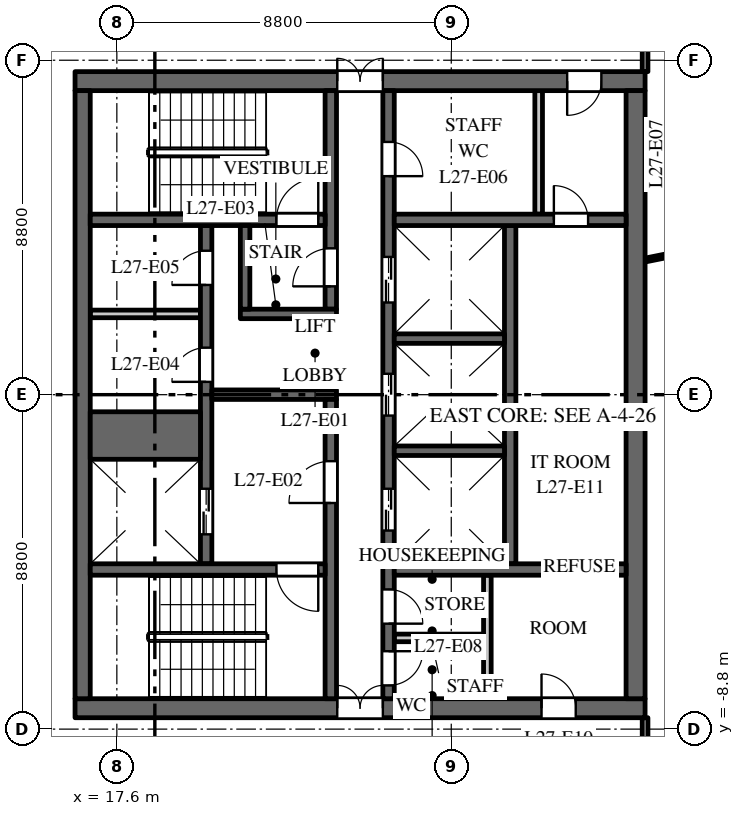
"""IFC4 building model, lengths in metres.
Left out: names, types, materials, properties, quantities, classifications, styles, units other than length and angle.
Written with IfcOpenShell. Run it as: python <this file> out.ifc"""

import sys

from ifc_helpers import new_model, si_unit, direction, frame, frame_2d, origin, place, context, subcontext, project, spatial, rectangle, extrude, element, fill, save


model = new_model("IFC4")
c1 = context("Model", 3, precision=1e-05, world=origin(), true_north=direction((0.0, 1.0)))
c2 = subcontext(c1, "Body", "Model", "MODEL_VIEW")
j1 = project(units=[si_unit("LENGTHUNIT", "METRE"), si_unit("PLANEANGLEUNIT", "RADIAN")], contexts=[c1])
p1 = place(None, origin())
s1 = spatial("IfcSite", under=j1, at=p1, CompositionType="ELEMENT")
p2 = place(p1, origin())
s2 = spatial("IfcBuilding", under=s1, at=p2, CompositionType="ELEMENT")
p3 = place(p2, frame((0.0, 0.0, 120.0)))
s3 = spatial("IfcBuildingStorey", under=s2, at=p3, CompositionType="ELEMENT", Elevation=120.0)
p4 = place(p3, frame((16.5, 8.25, 0.0), z_axis=(0.0, 0.0, 1.0), x_axis=(1.0, 0.0, 0.0)))
e1 = element("IfcWall", 1, at=p4, inside=s3, PredefinedType="SHEAR", context=c2, shape_type="SweptSolid", body=[
    extrude(rectangle(XDim=15.0, YDim=0.5, at=frame_2d((7.5, 0.0))), origin(), (0.0, 0.0, 1.0), 3.7),
])
p5 = place(p4, frame((6.9, 0.0, 0.0)))
e2 = element("IfcOpeningElement", 2, at=p5, cuts=e1, PredefinedType="OPENING", context=c2, shape_type="SweptSolid", body=[
    extrude(rectangle(XDim=1.2, YDim=2.1, at=frame_2d((0.6, 1.05))), frame((0.0, 0.26, 0.0), z_axis=(0.0, -1.0, 0.0), x_axis=(1.0, 0.0, 0.0)), (0.0, 0.0, 1.0), 0.52),
])
p6 = place(p4, frame((12.95, 0.0, 0.0)))
e3 = element("IfcOpeningElement", 3, at=p6, cuts=e1, PredefinedType="OPENING", context=c2, shape_type="SweptSolid", body=[
    extrude(rectangle(XDim=0.9, YDim=2.1, at=frame_2d((0.45, 1.05))), frame((0.0, 0.26, 0.0), z_axis=(0.0, -1.0, 0.0), x_axis=(1.0, 0.0, 0.0)), (0.0, 0.0, 1.0), 0.52),
])
p7 = place(p3, frame((16.5, -8.25, 0.0), z_axis=(0.0, 0.0, 1.0), x_axis=(1.0, 0.0, 0.0)))
e4 = element("IfcWall", 4, at=p7, inside=s3, PredefinedType="SHEAR", context=c2, shape_type="SweptSolid", body=[
    extrude(rectangle(XDim=15.0, YDim=0.5, at=frame_2d((7.5, 0.0))), origin(), (0.0, 0.0, 1.0), 3.7),
])
p8 = place(p7, frame((6.9, 0.0, 0.0)))
e5 = element("IfcOpeningElement", 5, at=p8, cuts=e4, PredefinedType="OPENING", context=c2, shape_type="SweptSolid", body=[
    extrude(rectangle(XDim=1.2, YDim=2.1, at=frame_2d((0.6, 1.05))), frame((0.0, 0.26, 0.0), z_axis=(0.0, -1.0, 0.0), x_axis=(1.0, 0.0, 0.0)), (0.0, 0.0, 1.0), 0.52),
])
p9 = place(p7, frame((12.275, 0.0, 0.0)))
e6 = element("IfcOpeningElement", 6, at=p9, cuts=e4, PredefinedType="OPENING", context=c2, shape_type="SweptSolid", body=[
    extrude(rectangle(XDim=0.9, YDim=2.1, at=frame_2d((0.45, 1.05))), frame((0.0, 0.26, 0.0), z_axis=(0.0, -1.0, 0.0), x_axis=(1.0, 0.0, 0.0)), (0.0, 0.0, 1.0), 0.52),
])
p10 = place(p3, frame((16.9, 2.125, 0.0), z_axis=(0.0, 0.0, 1.0), x_axis=(1.0, 0.0, 0.0)))
e7 = element("IfcWall", 7, at=p10, inside=s3, PredefinedType="PARTITIONING", context=c2, shape_type="SweptSolid", body=[
    extrude(rectangle(XDim=2.9, YDim=0.2, at=frame_2d((1.45, 0.0))), origin(), (0.0, 0.0, 1.0), 3.7),
])
p11 = place(p3, frame((27.95, -4.45, 0.0), z_axis=(0.0, 0.0, 1.0), x_axis=(0.0, 1.0, 0.0)))
e8 = element("IfcWall", 8, at=p11, inside=s3, PredefinedType="SHEAR", context=c2, shape_type="SweptSolid", body=[
    extrude(rectangle(XDim=8.9, YDim=0.3, at=frame_2d((4.45, 0.0))), origin(), (0.0, 0.0, 1.0), 3.7),
])
p12 = place(p3, frame((19.95, -4.45, 0.0), z_axis=(0.0, 0.0, 1.0), x_axis=(0.0, 1.0, 0.0)))
e9 = element("IfcWall", 9, at=p12, inside=s3, PredefinedType="SHEAR", context=c2, shape_type="SweptSolid", body=[
    extrude(rectangle(XDim=8.9, YDim=0.3, at=frame_2d((4.45, 0.0))), origin(), (0.0, 0.0, 1.0), 3.7),
])
p13 = place(p12, frame((0.775, 0.0, 0.0)))
e10 = element("IfcOpeningElement", 10, at=p13, cuts=e9, PredefinedType="OPENING", context=c2, shape_type="SweptSolid", body=[
    extrude(rectangle(XDim=1.2, YDim=2.1, at=frame_2d((0.6, 1.05))), frame((0.0, 0.16, 0.0), z_axis=(0.0, -1.0, 0.0), x_axis=(1.0, 0.0, 0.0)), (0.0, 0.0, 1.0), 0.32),
])
p14 = place(p12, frame((4.788, 0.0, 0.0)))
e11 = element("IfcOpeningElement", 11, at=p14, cuts=e9, PredefinedType="OPENING", context=c2, shape_type="SweptSolid", body=[
    extrude(rectangle(XDim=0.9, YDim=2.1, at=frame_2d((0.45, 1.05))), frame((0.0, 0.16, 0.0), z_axis=(0.0, -1.0, 0.0), x_axis=(1.0, 0.0, 0.0)), (0.0, 0.0, 1.0), 0.32),
])
p15 = place(p12, frame((7.337, 0.0, 0.0)))
e12 = element("IfcOpeningElement", 12, at=p15, cuts=e9, PredefinedType="OPENING", context=c2, shape_type="SweptSolid", body=[
    extrude(rectangle(XDim=0.9, YDim=2.1, at=frame_2d((0.45, 1.05))), frame((0.0, 0.16, 0.0), z_axis=(0.0, -1.0, 0.0), x_axis=(1.0, 0.0, 0.0)), (0.0, 0.0, 1.0), 0.32),
])
p16 = place(p3, frame((24.75, -8.0, 0.0), z_axis=(0.0, 0.0, 1.0), x_axis=(0.0, 1.0, 0.0)))
e13 = element("IfcWall", 13, at=p16, inside=s3, PredefinedType="SHEAR", context=c2, shape_type="SweptSolid", body=[
    extrude(rectangle(XDim=16.0, YDim=0.3, at=frame_2d((8.0, 0.0))), origin(), (0.0, 0.0, 1.0), 3.7),
])
p17 = place(p16, frame((4.425, 0.0, 0.0)))
e14 = element("IfcOpeningElement", 14, at=p17, cuts=e13, PredefinedType="OPENING", context=c2, shape_type="SweptSolid", body=[
    extrude(rectangle(XDim=1.1, YDim=2.1, at=frame_2d((0.55, 1.05))), frame((0.0, 0.16, 0.0), z_axis=(0.0, -1.0, 0.0), x_axis=(1.0, 0.0, 0.0)), (0.0, 0.0, 1.0), 0.32),
])
p18 = place(p16, frame((7.45, 0.0, 0.0)))
e15 = element("IfcOpeningElement", 15, at=p18, cuts=e13, PredefinedType="OPENING", context=c2, shape_type="SweptSolid", body=[
    extrude(rectangle(XDim=1.1, YDim=2.1, at=frame_2d((0.55, 1.05))), frame((0.0, 0.16, 0.0), z_axis=(0.0, -1.0, 0.0), x_axis=(1.0, 0.0, 0.0)), (0.0, 0.0, 1.0), 0.32),
])
p19 = place(p16, frame((10.425, 0.0, 0.0)))
e16 = element("IfcOpeningElement", 16, at=p19, cuts=e13, PredefinedType="OPENING", context=c2, shape_type="SweptSolid", body=[
    extrude(rectangle(XDim=1.2, YDim=2.1, at=frame_2d((0.6, 1.05))), frame((0.0, 0.16, 0.0), z_axis=(0.0, -1.0, 0.0), x_axis=(1.0, 0.0, 0.0)), (0.0, 0.0, 1.0), 0.32),
])
p20 = place(p16, frame((13.75, 0.0, 0.0)))
e17 = element("IfcOpeningElement", 17, at=p20, cuts=e13, PredefinedType="OPENING", context=c2, shape_type="SweptSolid", body=[
    extrude(rectangle(XDim=0.9, YDim=2.1, at=frame_2d((0.45, 1.05))), frame((0.0, 0.16, 0.0), z_axis=(0.0, -1.0, 0.0), x_axis=(1.0, 0.0, 0.0)), (0.0, 0.0, 1.0), 0.32),
])
p21 = place(p16, frame((1.975, 0.0, 0.0)))
e18 = element("IfcOpeningElement", 18, at=p21, cuts=e13, PredefinedType="OPENING", context=c2, shape_type="SweptSolid", body=[
    extrude(rectangle(XDim=0.9, YDim=2.1, at=frame_2d((0.45, 1.05))), frame((0.0, 0.16, 0.0), z_axis=(0.0, -1.0, 0.0), x_axis=(1.0, 0.0, 0.0)), (0.0, 0.0, 1.0), 0.32),
])
p22 = place(p16, frame((0.35, 0.0, 0.0)))
e19 = element("IfcOpeningElement", 19, at=p22, cuts=e13, PredefinedType="OPENING", context=c2, shape_type="SweptSolid", body=[
    extrude(rectangle(XDim=0.9, YDim=2.1, at=frame_2d((0.45, 1.05))), frame((0.0, 0.16, 0.0), z_axis=(0.0, -1.0, 0.0), x_axis=(1.0, 0.0, 0.0)), (0.0, 0.0, 1.0), 0.32),
])
p23 = place(p3, frame((20.1, 0.0, 0.0), z_axis=(0.0, 0.0, 1.0), x_axis=(1.0, 0.0, 0.0)))
e20 = element("IfcWall", 20, at=p23, inside=s3, PredefinedType="SHEAR", context=c2, shape_type="SweptSolid", body=[
    extrude(rectangle(XDim=3.28, YDim=0.25, at=frame_2d((1.64, 0.0))), origin(), (0.0, 0.0, 1.0), 3.7),
])
p24 = place(p3, frame((16.7, -8.0, 0.0), z_axis=(0.0, 0.0, 1.0), x_axis=(0.0, 1.0, 0.0)))
e21 = element("IfcWall", 21, at=p24, inside=s3, PredefinedType="SHEAR", context=c2, shape_type="SweptSolid", body=[
    extrude(rectangle(XDim=16.0, YDim=0.4, at=frame_2d((8.0, 0.0))), origin(), (0.0, 0.0, 1.0), 3.7),
])
p25 = place(p3, frame((31.25, -8.0, 0.0), z_axis=(0.0, 0.0, 1.0), x_axis=(0.0, 1.0, 0.0)))
e22 = element("IfcWall", 22, at=p25, inside=s3, PredefinedType="SHEAR", context=c2, shape_type="SweptSolid", body=[
    extrude(rectangle(XDim=16.0, YDim=0.5, at=frame_2d((8.0, 0.0))), origin(), (0.0, 0.0, 1.0), 3.7),
])
p26 = place(p3, frame((24.9, 4.6, 0.0), z_axis=(0.0, 0.0, 1.0), x_axis=(1.0, 0.0, 0.0)))
e23 = element("IfcWall", 23, at=p26, inside=s3, PredefinedType="SHEAR", context=c2, shape_type="SweptSolid", body=[
    extrude(rectangle(XDim=6.1, YDim=0.3, at=frame_2d((3.05, 0.0))), origin(), (0.0, 0.0, 1.0), 3.7),
])
p27 = place(p26, frame((4.2, 0.0, 0.0)))
e24 = element("IfcOpeningElement", 24, at=p27, cuts=e23, PredefinedType="OPENING", context=c2, shape_type="SweptSolid", body=[
    extrude(rectangle(XDim=0.9, YDim=2.1, at=frame_2d((0.45, 1.05))), frame((0.0, 0.16, 0.0), z_axis=(0.0, -1.0, 0.0), x_axis=(1.0, 0.0, 0.0)), (0.0, 0.0, 1.0), 0.32),
])
for number, where, z_axis, x_axis in (
    (25, (28.7, 4.75, 0.0), (0.0, 0.0, 1.0), (0.0, 1.0, 0.0)),
    (26, (27.35, -8.0, 0.0), (0.0, 0.0, 1.0), (0.0, 1.0, 0.0)),
):
    element("IfcWall", number, at=place(p3, frame(where, z_axis=z_axis, x_axis=x_axis)), inside=s3, PredefinedType="PARTITIONING", context=c2, shape_type="SweptSolid", body=[
        extrude(rectangle(XDim=3.25, YDim=0.2, at=frame_2d((1.625, 0.0))), origin(), (0.0, 0.0, 1.0), 3.7),
    ])
p28 = place(p3, frame((24.9, -6.4, 0.0), z_axis=(0.0, 0.0, 1.0), x_axis=(1.0, 0.0, 0.0)))
e27 = element("IfcWall", 27, at=p28, inside=s3, PredefinedType="PARTITIONING", context=c2, shape_type="SweptSolid", body=[
    extrude(rectangle(XDim=2.35, YDim=0.2, at=frame_2d((1.175, 0.0))), origin(), (0.0, 0.0, 1.0), 3.7),
])
p29 = place(p3, frame((24.9, -4.6, 0.0), z_axis=(0.0, 0.0, 1.0), x_axis=(1.0, 0.0, 0.0)))
e28 = element("IfcWall", 28, at=p29, inside=s3, PredefinedType="SHEAR", context=c2, shape_type="SweptSolid", body=[
    extrude(rectangle(XDim=6.1, YDim=0.3, at=frame_2d((3.05, 0.0))), origin(), (0.0, 0.0, 1.0), 3.7),
])
p30 = place(p3, frame((16.9, -1.075, 0.0), z_axis=(0.0, 0.0, 1.0), x_axis=(1.0, 0.0, 0.0)))
e29 = element("IfcWall", 29, at=p30, inside=s3, PredefinedType="SHEAR", context=c2, shape_type="SweptSolid", body=[
    extrude(rectangle(XDim=2.9, YDim=1.25, at=frame_2d((1.45, 0.0))), origin(), (0.0, 0.0, 1.0), 3.7),
])
for number, where, z_axis, x_axis in (
    (30, (24.9, -1.475, 0.0), (0.0, 0.0, 1.0), (1.0, 0.0, 0.0)),
    (31, (24.9, 1.475, 0.0), (0.0, 0.0, 1.0), (1.0, 0.0, 0.0)),
):
    element("IfcWall", number, at=place(p3, frame(where, z_axis=z_axis, x_axis=x_axis)), inside=s3, PredefinedType="SHEAR", context=c2, shape_type="SweptSolid", body=[
        extrude(rectangle(XDim=2.9, YDim=0.25, at=frame_2d((1.45, 0.0))), origin(), (0.0, 0.0, 1.0), 3.7),
    ])
p31 = place(p3, frame((23.23, 2.25, 0.0), z_axis=(0.0, 0.0, 1.0), x_axis=(0.0, 1.0, 0.0)))
e32 = element("IfcWall", 32, at=p31, inside=s3, PredefinedType="SHEAR", context=c2, shape_type="SweptSolid", body=[
    extrude(rectangle(XDim=5.75, YDim=0.3, at=frame_2d((2.875, 0.0))), origin(), (0.0, 0.0, 1.0), 3.7),
])
p32 = place(p31, frame((0.6, 0.0, 0.0)))
e33 = element("IfcOpeningElement", 33, at=p32, cuts=e32, PredefinedType="OPENING", context=c2, shape_type="SweptSolid", body=[
    extrude(rectangle(XDim=1.0, YDim=2.1, at=frame_2d((0.5, 1.05))), frame((0.0, 0.16, 0.0), z_axis=(0.0, -1.0, 0.0), x_axis=(1.0, 0.0, 0.0)), (0.0, 0.0, 1.0), 0.32),
])
p33 = place(p3, frame((23.23, -8.0, 0.0), z_axis=(0.0, 0.0, 1.0), x_axis=(0.0, 1.0, 0.0)))
e34 = element("IfcWall", 34, at=p33, inside=s3, PredefinedType="SHEAR", context=c2, shape_type="SweptSolid", body=[
    extrude(rectangle(XDim=7.875, YDim=0.3, at=frame_2d((3.938, 0.0))), origin(), (0.0, 0.0, 1.0), 3.7),
])
p34 = place(p33, frame((5.15, 0.0, 0.0)))
e35 = element("IfcOpeningElement", 35, at=p34, cuts=e34, PredefinedType="OPENING", context=c2, shape_type="SweptSolid", body=[
    extrude(rectangle(XDim=1.1, YDim=2.1, at=frame_2d((0.55, 1.05))), frame((0.0, 0.16, 0.0), z_axis=(0.0, -1.0, 0.0), x_axis=(1.0, 0.0, 0.0)), (0.0, 0.0, 1.0), 0.32),
])
p35 = place(p3, frame((16.9, 4.6, 0.0), z_axis=(0.0, 0.0, 1.0), x_axis=(1.0, 0.0, 0.0)))
e36 = element("IfcWall", 36, at=p35, inside=s3, PredefinedType="SHEAR", context=c2, shape_type="SweptSolid", body=[
    extrude(rectangle(XDim=6.18, YDim=0.3, at=frame_2d((3.09, 0.0))), origin(), (0.0, 0.0, 1.0), 3.7),
])
p36 = place(p35, frame((4.9, 0.0, 0.0)))
e37 = element("IfcOpeningElement", 37, at=p36, cuts=e36, PredefinedType="OPENING", context=c2, shape_type="SweptSolid", body=[
    extrude(rectangle(XDim=1.1, YDim=2.1, at=frame_2d((0.55, 1.05))), frame((0.0, 0.16, 0.0), z_axis=(0.0, -1.0, 0.0), x_axis=(1.0, 0.0, 0.0)), (0.0, 0.0, 1.0), 0.32),
])
p37 = place(p3, frame((16.9, -4.6, 0.0), z_axis=(0.0, 0.0, 1.0), x_axis=(1.0, 0.0, 0.0)))
e38 = element("IfcWall", 38, at=p37, inside=s3, PredefinedType="SHEAR", context=c2, shape_type="SweptSolid", body=[
    extrude(rectangle(XDim=6.18, YDim=0.3, at=frame_2d((3.09, 0.0))), origin(), (0.0, 0.0, 1.0), 3.7),
])
p38 = place(p37, frame((4.9, 0.0, 0.0)))
e39 = element("IfcOpeningElement", 39, at=p38, cuts=e38, PredefinedType="OPENING", context=c2, shape_type="SweptSolid", body=[
    extrude(rectangle(XDim=1.1, YDim=2.1, at=frame_2d((0.55, 1.05))), frame((0.0, 0.16, 0.0), z_axis=(0.0, -1.0, 0.0), x_axis=(1.0, 0.0, 0.0)), (0.0, 0.0, 1.0), 0.32),
])
p39 = place(p3, frame((20.85, 2.125, 0.0), z_axis=(0.0, 0.0, 1.0), x_axis=(1.0, 0.0, 0.0)))
e40 = element("IfcWall", 40, at=p39, inside=s3, PredefinedType="SHEAR", context=c2, shape_type="SweptSolid", body=[
    extrude(rectangle(XDim=2.53, YDim=0.25, at=frame_2d((1.265, 0.0))), origin(), (0.0, 0.0, 1.0), 3.7),
])
p40 = place(p3, frame((20.975, 2.25, 0.0), z_axis=(0.0, 0.0, 1.0), x_axis=(0.0, 1.0, 0.0)))
e41 = element("IfcWall", 41, at=p40, inside=s3, PredefinedType="SHEAR", context=c2, shape_type="SweptSolid", body=[
    extrude(rectangle(XDim=2.2, YDim=0.25, at=frame_2d((1.1, 0.0))), origin(), (0.0, 0.0, 1.0), 3.7),
])
p41 = place(p3, frame((31.5, -10.7, 0.0), z_axis=(0.0, 0.0, 1.0), x_axis=(0.0, 1.0, 0.0)))
e42 = element("IfcWall", 42, at=p41, inside=s3, PredefinedType="PARTITIONING", context=c2, shape_type="SweptSolid", body=[
    extrude(rectangle(XDim=2.2, YDim=0.15, at=frame_2d((1.1, 0.0))), origin(), (0.0, 0.0, 1.0), 2.9),
])
p42 = place(p41, frame((0.65, 0.0, 0.0)))
e43 = element("IfcOpeningElement", 43, at=p42, cuts=e42, PredefinedType="OPENING", context=c2, shape_type="SweptSolid", body=[
    extrude(rectangle(XDim=1.0, YDim=2.1, at=frame_2d((0.5, 1.05))), frame((0.0, 0.085, 0.0), z_axis=(0.0, -1.0, 0.0), x_axis=(1.0, 0.0, 0.0)), (0.0, 0.0, 1.0), 0.17),
])
p43 = place(p3, frame((31.5, 3.542, 0.0), z_axis=(0.0, 0.0, 1.0), x_axis=(0.980357474535, 0.197228857227, 0.0)))
e44 = element("IfcWall", 44, at=p43, inside=s3, PredefinedType="PARTITIONING", context=c2, shape_type="SweptSolid", body=[
    extrude(rectangle(XDim=4.092, YDim=0.1, at=frame_2d((2.046, 0.0))), origin(), (0.0, 0.0, 1.0), 2.9),
])
p44 = place(p3, frame((31.5, 8.5, 0.0), z_axis=(0.0, 0.0, 1.0), x_axis=(0.0, 1.0, 0.0)))
e45 = element("IfcWall", 45, at=p44, inside=s3, PredefinedType="PARTITIONING", context=c2, shape_type="SweptSolid", body=[
    extrude(rectangle(XDim=2.2, YDim=0.15, at=frame_2d((1.1, 0.0))), origin(), (0.0, 0.0, 1.0), 2.9),
])
p45 = place(p13, origin())
e46 = element("IfcDoor", 46, at=p45, inside=s3, OperationType="DOUBLE_DOOR_SLIDING", PredefinedType="DOOR", context=c2, shape_type="SweptSolid", body=[
    extrude(rectangle(XDim=1.2, YDim=2.1, at=frame_2d((0.6, 1.05))), frame((0.0, 0.025, 0.0), z_axis=(0.0, -1.0, 0.0), x_axis=(1.0, 0.0, 0.0)), (0.0, 0.0, 1.0), 0.05),
])
fill(e10, e46)
p46 = place(p17, origin())
e47 = element("IfcDoor", 47, at=p46, inside=s3, OperationType="DOUBLE_DOOR_SLIDING", PredefinedType="DOOR", context=c2, shape_type="SweptSolid", body=[
    extrude(rectangle(XDim=1.1, YDim=2.1, at=frame_2d((0.55, 1.05))), frame((0.0, 0.025, 0.0), z_axis=(0.0, -1.0, 0.0), x_axis=(1.0, 0.0, 0.0)), (0.0, 0.0, 1.0), 0.05),
])
fill(e14, e47)
p47 = place(p18, origin())
e48 = element("IfcDoor", 48, at=p47, inside=s3, OperationType="DOUBLE_DOOR_SLIDING", PredefinedType="DOOR", context=c2, shape_type="SweptSolid", body=[
    extrude(rectangle(XDim=1.1, YDim=2.1, at=frame_2d((0.55, 1.05))), frame((0.0, 0.025, 0.0), z_axis=(0.0, -1.0, 0.0), x_axis=(1.0, 0.0, 0.0)), (0.0, 0.0, 1.0), 0.05),
])
fill(e15, e48)
p48 = place(p19, origin())
e49 = element("IfcDoor", 49, at=p48, inside=s3, OperationType="DOUBLE_DOOR_SLIDING", PredefinedType="DOOR", context=c2, shape_type="SweptSolid", body=[
    extrude(rectangle(XDim=1.2, YDim=2.1, at=frame_2d((0.6, 1.05))), frame((0.0, 0.025, 0.0), z_axis=(0.0, -1.0, 0.0), x_axis=(1.0, 0.0, 0.0)), (0.0, 0.0, 1.0), 0.05),
])
fill(e16, e49)
p49 = place(p36, origin())
e50 = element("IfcDoor", 50, at=p49, inside=s3, OperationType="SINGLE_SWING_LEFT", PredefinedType="DOOR", context=c2, shape_type="SweptSolid", body=[
    extrude(rectangle(XDim=1.1, YDim=2.1, at=frame_2d((0.55, 1.05))), frame((0.0, 0.025, 0.0), z_axis=(0.0, -1.0, 0.0), x_axis=(1.0, 0.0, 0.0)), (0.0, 0.0, 1.0), 0.05),
])
fill(e37, e50)
p50 = place(p38, origin())
e51 = element("IfcDoor", 51, at=p50, inside=s3, OperationType="SINGLE_SWING_RIGHT", PredefinedType="DOOR", context=c2, shape_type="SweptSolid", body=[
    extrude(rectangle(XDim=1.1, YDim=2.1, at=frame_2d((0.55, 1.05))), frame((0.0, 0.025, 0.0), z_axis=(0.0, -1.0, 0.0), x_axis=(1.0, 0.0, 0.0)), (0.0, 0.0, 1.0), 0.05),
])
fill(e39, e51)
p51 = place(p34, origin())
e52 = element("IfcDoor", 52, at=p51, inside=s3, OperationType="SINGLE_SWING_RIGHT", PredefinedType="DOOR", context=c2, shape_type="SweptSolid", body=[
    extrude(rectangle(XDim=1.1, YDim=2.1, at=frame_2d((0.55, 1.05))), frame((0.0, 0.025, 0.0), z_axis=(0.0, -1.0, 0.0), x_axis=(1.0, 0.0, 0.0)), (0.0, 0.0, 1.0), 0.05),
])
fill(e35, e52)
p52 = place(p32, origin())
e53 = element("IfcDoor", 53, at=p52, inside=s3, OperationType="SINGLE_SWING_RIGHT", PredefinedType="DOOR", context=c2, shape_type="SweptSolid", body=[
    extrude(rectangle(XDim=1.0, YDim=2.1, at=frame_2d((0.5, 1.05))), frame((0.0, 0.025, 0.0), z_axis=(0.0, -1.0, 0.0), x_axis=(1.0, 0.0, 0.0)), (0.0, 0.0, 1.0), 0.05),
])
fill(e33, e53)
p53 = place(p5, origin())
e54 = element("IfcDoor", 54, at=p53, inside=s3, OperationType="DOUBLE_DOOR_DOUBLE_SWING", PredefinedType="DOOR", context=c2, shape_type="SweptSolid", body=[
    extrude(rectangle(XDim=1.2, YDim=2.1, at=frame_2d((0.6, 1.05))), frame((0.0, 0.025, 0.0), z_axis=(0.0, -1.0, 0.0), x_axis=(1.0, 0.0, 0.0)), (0.0, 0.0, 1.0), 0.05),
])
fill(e2, e54)
p54 = place(p8, origin())
e55 = element("IfcDoor", 55, at=p54, inside=s3, OperationType="DOUBLE_DOOR_DOUBLE_SWING", PredefinedType="DOOR", context=c2, shape_type="SweptSolid", body=[
    extrude(rectangle(XDim=1.2, YDim=2.1, at=frame_2d((0.6, 1.05))), frame((0.0, 0.025, 0.0), z_axis=(0.0, -1.0, 0.0), x_axis=(1.0, 0.0, 0.0)), (0.0, 0.0, 1.0), 0.05),
])
fill(e5, e55)
p55 = place(p14, origin())
e56 = element("IfcDoor", 56, at=p55, inside=s3, OperationType="SINGLE_SWING_RIGHT", PredefinedType="DOOR", context=c2, shape_type="SweptSolid", body=[
    extrude(rectangle(XDim=0.9, YDim=2.1, at=frame_2d((0.45, 1.05))), frame((0.0, 0.025, 0.0), z_axis=(0.0, -1.0, 0.0), x_axis=(1.0, 0.0, 0.0)), (0.0, 0.0, 1.0), 0.05),
])
fill(e11, e56)
p56 = place(p15, origin())
e57 = element("IfcDoor", 57, at=p56, inside=s3, OperationType="SINGLE_SWING_RIGHT", PredefinedType="DOOR", context=c2, shape_type="SweptSolid", body=[
    extrude(rectangle(XDim=0.9, YDim=2.1, at=frame_2d((0.45, 1.05))), frame((0.0, 0.025, 0.0), z_axis=(0.0, -1.0, 0.0), x_axis=(1.0, 0.0, 0.0)), (0.0, 0.0, 1.0), 0.05),
])
fill(e12, e57)
p57 = place(p20, origin())
e58 = element("IfcDoor", 58, at=p57, inside=s3, OperationType="SINGLE_SWING_LEFT", PredefinedType="DOOR", context=c2, shape_type="SweptSolid", body=[
    extrude(rectangle(XDim=0.9, YDim=2.1, at=frame_2d((0.45, 1.05))), frame((0.0, 0.025, 0.0), z_axis=(0.0, -1.0, 0.0), x_axis=(1.0, 0.0, 0.0)), (0.0, 0.0, 1.0), 0.05),
])
fill(e17, e58)
p58 = place(p6, origin())
e59 = element("IfcDoor", 59, at=p58, inside=s3, OperationType="SINGLE_SWING_LEFT", PredefinedType="DOOR", context=c2, shape_type="SweptSolid", body=[
    extrude(rectangle(XDim=0.9, YDim=2.1, at=frame_2d((0.45, 1.05))), frame((0.0, 0.025, 0.0), z_axis=(0.0, -1.0, 0.0), x_axis=(1.0, 0.0, 0.0)), (0.0, 0.0, 1.0), 0.05),
])
fill(e3, e59)
p59 = place(p21, origin())
e60 = element("IfcDoor", 60, at=p59, inside=s3, OperationType="SINGLE_SWING_LEFT", PredefinedType="DOOR", context=c2, shape_type="SweptSolid", body=[
    extrude(rectangle(XDim=0.9, YDim=2.1, at=frame_2d((0.45, 1.05))), frame((0.0, 0.025, 0.0), z_axis=(0.0, -1.0, 0.0), x_axis=(1.0, 0.0, 0.0)), (0.0, 0.0, 1.0), 0.05),
])
fill(e18, e60)
p60 = place(p22, origin())
e61 = element("IfcDoor", 61, at=p60, inside=s3, OperationType="SINGLE_SWING_RIGHT", PredefinedType="DOOR", context=c2, shape_type="SweptSolid", body=[
    extrude(rectangle(XDim=0.9, YDim=2.1, at=frame_2d((0.45, 1.05))), frame((0.0, 0.025, 0.0), z_axis=(0.0, -1.0, 0.0), x_axis=(1.0, 0.0, 0.0)), (0.0, 0.0, 1.0), 0.05),
])
fill(e19, e61)
p61 = place(p9, origin())
e62 = element("IfcDoor", 62, at=p61, inside=s3, OperationType="SINGLE_SWING_RIGHT", PredefinedType="DOOR", context=c2, shape_type="SweptSolid", body=[
    extrude(rectangle(XDim=0.9, YDim=2.1, at=frame_2d((0.45, 1.05))), frame((0.0, 0.025, 0.0), z_axis=(0.0, -1.0, 0.0), x_axis=(1.0, 0.0, 0.0)), (0.0, 0.0, 1.0), 0.05),
])
fill(e6, e62)
p62 = place(p27, origin())
e63 = element("IfcDoor", 63, at=p62, inside=s3, OperationType="SINGLE_SWING_RIGHT", PredefinedType="DOOR", context=c2, shape_type="SweptSolid", body=[
    extrude(rectangle(XDim=0.9, YDim=2.1, at=frame_2d((0.45, 1.05))), frame((0.0, 0.025, 0.0), z_axis=(0.0, -1.0, 0.0), x_axis=(1.0, 0.0, 0.0)), (0.0, 0.0, 1.0), 0.05),
])
fill(e24, e63)
save(model, sys.argv[1])
